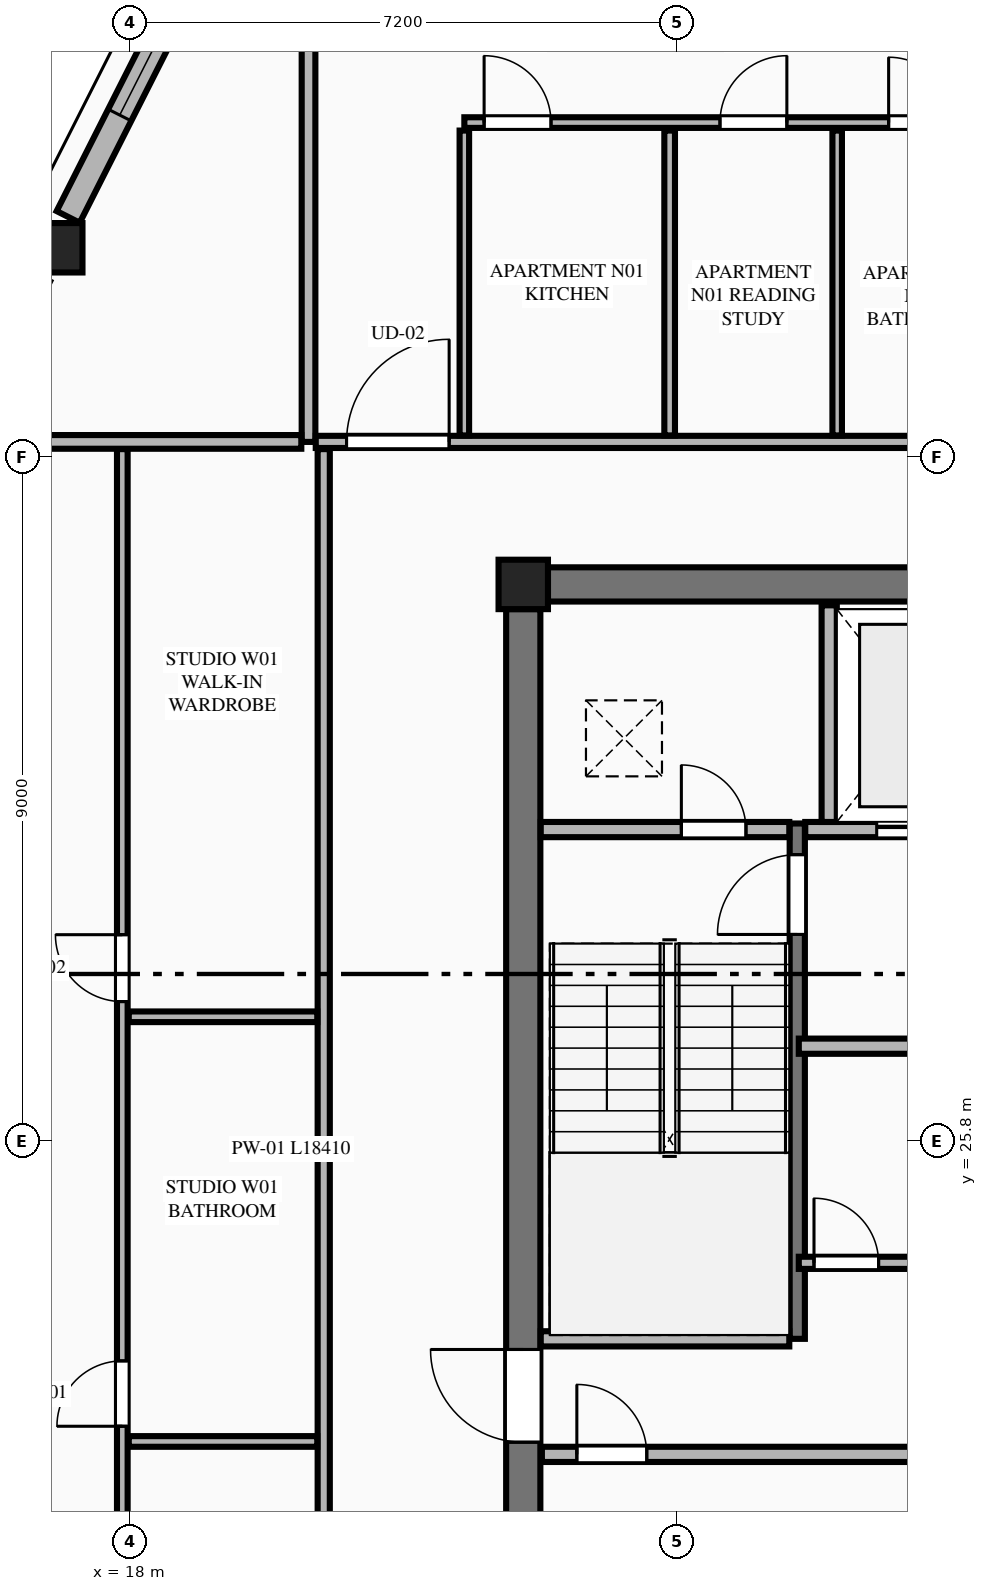
"""IFC4 building model, lengths in metres.
Left out: names, types, materials, properties, quantities, classifications, styles, units other than length and angle.
Written with IfcOpenShell. Run it as: python <this file> out.ifc"""

import sys

from ifc_helpers import new_model, si_unit, direction, frame, frame_2d, origin, origin_2d, place, context, subcontext, project, spatial, rectangle, extrude, element, fill, save


model = new_model("IFC4")
c1 = context("Model", 3, precision=1e-05, world=origin(), true_north=direction((0.0, 1.0)))
c2 = subcontext(c1, "Body", "Model", "MODEL_VIEW")
j1 = project(units=[si_unit("LENGTHUNIT", "METRE"), si_unit("PLANEANGLEUNIT", "RADIAN")], contexts=[c1])
p1 = place(None, origin())
s1 = spatial("IfcSite", under=j1, at=p1, CompositionType="ELEMENT")
p2 = place(p1, origin())
s2 = spatial("IfcBuilding", under=s1, at=p2, CompositionType="ELEMENT")
p3 = place(p2, frame((0.0, 0.0, 263.5)))
s3 = spatial("IfcBuildingStorey", under=s2, at=p3, CompositionType="ELEMENT", Elevation=263.5)
p4 = place(p3, frame((23.175, 33.125, 0.0), z_axis=(0.0, 0.0, 1.0), x_axis=(1.0, 0.0, 0.0)))
e1 = element("IfcColumn", 1, at=p4, inside=s3, PredefinedType="COLUMN", context=c2, shape_type="SweptSolid", body=[
    extrude(rectangle(XDim=0.65, YDim=0.65, at=origin_2d()), origin(), (0.0, 0.0, 1.0), 3.65),
])
p5 = place(p3, frame((23.5, 33.125, 0.0), z_axis=(0.0, 0.0, 1.0), x_axis=(1.0, 0.0, 0.0)))
e2 = element("IfcWall", 2, at=p5, inside=s3, PredefinedType="SHEAR", context=c2, shape_type="SweptSolid", body=[
    extrude(rectangle(XDim=17.8, YDim=0.45, at=frame_2d((8.9, 0.0))), origin(), (0.0, 0.0, 1.0), 3.45),
])
p6 = place(p3, frame((23.175, 19.0, 0.0), z_axis=(0.0, 0.0, 1.0), x_axis=(0.0, 1.0, 0.0)))
e3 = element("IfcWall", 3, at=p6, inside=s3, PredefinedType="SHEAR", context=c2, shape_type="SweptSolid", body=[
    extrude(rectangle(XDim=13.8, YDim=0.45, at=frame_2d((6.9, 0.0))), origin(), (0.0, 0.0, 1.0), 3.45),
])
p7 = place(p6, frame((2.84, 0.0, 0.0)))
e4 = element("IfcOpeningElement", 4, at=p7, cuts=e3, PredefinedType="OPENING", context=c2, shape_type="SweptSolid", body=[
    extrude(rectangle(XDim=1.22, YDim=2.25, at=frame_2d((0.61, 1.125))), frame((0.0, 0.235, 0.0), z_axis=(0.0, -1.0, 0.0), x_axis=(1.0, 0.0, 0.0)), (0.0, 0.0, 1.0), 0.47),
])
p8 = place(p3, frame((17.051, 37.554, 0.0), z_axis=(0.0, 0.0, 1.0), x_axis=(1.0, 0.0, 0.0)))
e5 = element("IfcColumn", 5, at=p8, inside=s3, PredefinedType="COLUMN", context=c2, shape_type="SweptSolid", body=[
    extrude(rectangle(XDim=0.65, YDim=0.65, at=origin_2d()), origin(), (0.0, 0.0, 1.0), 3.65),
])
p9 = place(p3, frame((26.78, 23.2, 0.0), z_axis=(0.0, 0.0, 1.0), x_axis=(0.0, 1.0, 0.0)))
e6 = element("IfcWall", 6, at=p9, inside=s3, PredefinedType="SHEAR", context=c2, shape_type="SweptSolid", body=[
    extrude(rectangle(XDim=6.78, YDim=0.2, at=frame_2d((3.39, 0.0))), origin(), (0.0, 0.0, 1.0), 3.65),
])
p10 = place(p9, frame((5.32, 0.0, 0.0)))
e7 = element("IfcOpeningElement", 7, at=p10, cuts=e6, PredefinedType="OPENING", context=c2, shape_type="SweptSolid", body=[
    extrude(rectangle(XDim=1.05, YDim=2.15, at=frame_2d((0.525, 1.075))), frame((0.0, 0.11, 0.0), z_axis=(0.0, -1.0, 0.0), x_axis=(1.0, 0.0, 0.0)), (0.0, 0.0, 1.0), 0.22),
])
p11 = place(p3, frame((23.405, 23.2, 0.0), z_axis=(0.0, 0.0, 1.0), x_axis=(1.0, 0.0, 0.0)))
e8 = element("IfcWall", 8, at=p11, inside=s3, PredefinedType="PLUMBINGWALL", context=c2, shape_type="SweptSolid", body=[
    extrude(rectangle(XDim=3.27, YDim=0.2, at=frame_2d((1.635, 0.0))), origin(), (0.0, 0.0, 1.0), 3.45),
])
p12 = place(p3, frame((23.405, 29.9, 0.0), z_axis=(0.0, 0.0, 1.0), x_axis=(1.0, 0.0, 0.0)))
e9 = element("IfcWall", 9, at=p12, inside=s3, PredefinedType="PLUMBINGWALL", context=c2, shape_type="SweptSolid", body=[
    extrude(rectangle(XDim=3.27, YDim=0.2, at=frame_2d((1.635, 0.0))), origin(), (0.0, 0.0, 1.0), 3.45),
])
p13 = place(p12, frame((1.85, 0.0, 0.0)))
e10 = element("IfcOpeningElement", 10, at=p13, cuts=e9, PredefinedType="OPENING", context=c2, shape_type="SweptSolid", body=[
    extrude(rectangle(XDim=0.85, YDim=2.05, at=frame_2d((0.425, 1.025))), frame((0.0, 0.11, 0.0), z_axis=(0.0, -1.0, 0.0), x_axis=(1.0, 0.0, 0.0)), (0.0, 0.0, 1.0), 0.22),
])
p14 = place(p3, frame((26.885, 29.9, 0.0), z_axis=(0.0, 0.0, 1.0), x_axis=(1.0, 0.0, 0.0)))
e11 = element("IfcWall", 11, at=p14, inside=s3, PredefinedType="PLUMBINGWALL", context=c2, shape_type="SweptSolid", body=[
    extrude(rectangle(XDim=3.015, YDim=0.2, at=frame_2d((1.507, 0.0))), origin(), (0.0, 0.0, 1.0), 3.45),
])
p15 = place(p14, frame((0.94, 0.0, 0.0)))
e12 = element("IfcOpeningElement", 12, at=p15, cuts=e11, PredefinedType="OPENING", context=c2, shape_type="SweptSolid", body=[
    extrude(rectangle(XDim=1.15, YDim=2.2, at=frame_2d((0.575, 1.1))), frame((0.0, 0.11, 0.0), z_axis=(0.0, -1.0, 0.0), x_axis=(1.0, 0.0, 0.0)), (0.0, 0.0, 1.0), 0.22),
])
p16 = place(p3, frame((27.2, 30.0, 0.0), z_axis=(0.0, 0.0, 1.0), x_axis=(0.0, 1.0, 0.0)))
e13 = element("IfcWall", 13, at=p16, inside=s3, PredefinedType="PLUMBINGWALL", context=c2, shape_type="SweptSolid", body=[
    extrude(rectangle(XDim=2.85, YDim=0.2, at=frame_2d((1.425, 0.0))), origin(), (0.0, 0.0, 1.0), 3.45),
])
p17 = place(p3, frame((26.8, 27.05, 0.0), z_axis=(0.0, 0.0, 1.0), x_axis=(1.0, 0.0, 0.0)))
e14 = element("IfcWall", 14, at=p17, inside=s3, PredefinedType="PLUMBINGWALL", context=c2, shape_type="SweptSolid", body=[
    extrude(rectangle(XDim=3.2, YDim=0.2, at=frame_2d((1.6, 0.0))), origin(), (0.0, 0.0, 1.0), 3.45),
])
p18 = place(p3, frame((26.8, 24.2, 0.0), z_axis=(0.0, 0.0, 1.0), x_axis=(1.0, 0.0, 0.0)))
e15 = element("IfcWall", 15, at=p18, inside=s3, PredefinedType="PARTITIONING", context=c2, shape_type="SweptSolid", body=[
    extrude(rectangle(XDim=3.2, YDim=0.16, at=frame_2d((1.6, 0.0))), origin(), (0.0, 0.0, 1.0), 3.45),
])
p19 = place(p18, frame((0.2, 0.0, 0.0)))
e16 = element("IfcOpeningElement", 16, at=p19, cuts=e15, PredefinedType="OPENING", context=c2, shape_type="SweptSolid", body=[
    extrude(rectangle(XDim=0.85, YDim=2.05, at=frame_2d((0.425, 1.025))), frame((0.0, 0.09, 0.0), z_axis=(0.0, -1.0, 0.0), x_axis=(1.0, 0.0, 0.0)), (0.0, 0.0, 1.0), 0.18),
])
p20 = place(p18, frame((1.8, 0.0, 0.0)))
e17 = element("IfcOpeningElement", 17, at=p20, cuts=e15, PredefinedType="OPENING", context=c2, shape_type="SweptSolid", body=[
    extrude(rectangle(XDim=0.85, YDim=2.05, at=frame_2d((0.425, 1.025))), frame((0.0, 0.09, 0.0), z_axis=(0.0, -1.0, 0.0), x_axis=(1.0, 0.0, 0.0)), (0.0, 0.0, 1.0), 0.18),
])
p21 = place(p3, frame((23.42, 21.68, 0.0), z_axis=(0.0, 0.0, 1.0), x_axis=(1.0, 0.0, 0.0)))
e18 = element("IfcWall", 18, at=p21, inside=s3, PredefinedType="PLUMBINGWALL", context=c2, shape_type="SweptSolid", body=[
    extrude(rectangle(XDim=17.96, YDim=0.2, at=frame_2d((8.98, 0.0))), origin(), (0.0, 0.0, 1.0), 3.45),
])
p22 = place(p21, frame((0.46, 0.0, 0.0)))
e19 = element("IfcOpeningElement", 19, at=p22, cuts=e18, PredefinedType="OPENING", context=c2, shape_type="SweptSolid", body=[
    extrude(rectangle(XDim=0.92, YDim=2.15, at=frame_2d((0.46, 1.075))), frame((0.0, 0.11, 0.0), z_axis=(0.0, -1.0, 0.0), x_axis=(1.0, 0.0, 0.0)), (0.0, 0.0, 1.0), 0.22),
])
p23 = place(p21, frame((6.48, 0.0, 0.0)))
e20 = element("IfcOpeningElement", 20, at=p23, cuts=e18, PredefinedType="OPENING", context=c2, shape_type="SweptSolid", body=[
    extrude(rectangle(XDim=0.92, YDim=2.15, at=frame_2d((0.46, 1.075))), frame((0.0, 0.11, 0.0), z_axis=(0.0, -1.0, 0.0), x_axis=(1.0, 0.0, 0.0)), (0.0, 0.0, 1.0), 0.22),
])
p24 = place(p21, frame((12.48, 0.0, 0.0)))
e21 = element("IfcOpeningElement", 21, at=p24, cuts=e18, PredefinedType="OPENING", context=c2, shape_type="SweptSolid", body=[
    extrude(rectangle(XDim=0.92, YDim=2.15, at=frame_2d((0.46, 1.075))), frame((0.0, 0.11, 0.0), z_axis=(0.0, -1.0, 0.0), x_axis=(1.0, 0.0, 0.0)), (0.0, 0.0, 1.0), 0.22),
])
p25 = place(p3, frame((19.244, 42.023, 0.0), z_axis=(0.0, 0.0, 1.0), x_axis=(-0.45149770819, -0.892272278791, 0.0)))
e22 = element("IfcWall", 22, at=p25, inside=s3, PredefinedType="STANDARD", context=c2, shape_type="SweptSolid", body=[
    extrude(rectangle(XDim=4.553, YDim=0.34, at=frame_2d((2.277, 0.0))), origin(), (0.0, 0.0, 1.0), 2.983),
])
p26 = place(p25, frame((1.502, 0.0, 0.75)))
e23 = element("IfcOpeningElement", 23, at=p26, cuts=e22, PredefinedType="OPENING", context=c2, shape_type="SweptSolid", body=[
    extrude(rectangle(XDim=1.55, YDim=2.05, at=frame_2d((0.775, 1.025))), frame((0.0, 0.18, 0.0), z_axis=(0.0, -1.0, 0.0), x_axis=(1.0, 0.0, 0.0)), (0.0, 0.0, 1.0), 0.36),
])
p27 = place(p3, frame((20.35, 35.0, 0.0), z_axis=(0.0, 0.0, 1.0), x_axis=(0.0, 1.0, 0.0)))
e24 = element("IfcWall", 24, at=p27, inside=s3, PredefinedType="PARTITIONING", context=c2, shape_type="SweptSolid", body=[
    extrude(rectangle(XDim=8.481, YDim=0.18, at=frame_2d((4.24, 0.0))), origin(), (0.0, 0.0, 1.0), 3.45),
])
p28 = place(p3, frame((20.445, 35.0, 0.0), z_axis=(0.0, 0.0, 1.0), x_axis=(1.0, 0.0, 0.0)))
e25 = element("IfcWall", 25, at=p28, inside=s3, PredefinedType="PARTITIONING", context=c2, shape_type="SweptSolid", body=[
    extrude(rectangle(XDim=23.91, YDim=0.16, at=frame_2d((11.955, 0.0))), origin(), (0.0, 0.0, 1.0), 3.45),
])
p29 = place(p28, frame((0.405, 0.0, 0.0)))
e26 = element("IfcOpeningElement", 26, at=p29, cuts=e25, PredefinedType="OPENING", context=c2, shape_type="SweptSolid", body=[
    extrude(rectangle(XDim=1.35, YDim=2.35, at=frame_2d((0.675, 1.175))), frame((0.0, 0.09, 0.0), z_axis=(0.0, -1.0, 0.0), x_axis=(1.0, 0.0, 0.0)), (0.0, 0.0, 1.0), 0.18),
])
p30 = place(p3, frame((22.4, 35.085, 0.0), z_axis=(0.0, 0.0, 1.0), x_axis=(0.0, 1.0, 0.0)))
e27 = element("IfcWall", 27, at=p30, inside=s3, PredefinedType="PARTITIONING", context=c2, shape_type="SweptSolid", body=[
    extrude(rectangle(XDim=4.011, YDim=0.125, at=frame_2d((2.005, 0.0))), origin(), (0.0, 0.0, 1.0), 3.45),
])
p31 = place(p3, frame((22.4, 39.201, 0.0), z_axis=(0.0, 0.0, 1.0), x_axis=(1.0, 0.0, 0.0)))
e28 = element("IfcWall", 28, at=p31, inside=s3, PredefinedType="PLUMBINGWALL", context=c2, shape_type="SweptSolid", body=[
    extrude(rectangle(XDim=7.108, YDim=0.14, at=frame_2d((3.554, 0.0))), origin(), (0.0, 0.0, 1.0), 3.45),
])
p32 = place(p31, frame((5.582, 0.0, 0.0)))
e29 = element("IfcOpeningElement", 29, at=p32, cuts=e28, PredefinedType="OPENING", context=c2, shape_type="SweptSolid", body=[
    extrude(rectangle(XDim=0.86, YDim=2.1, at=frame_2d((0.43, 1.05))), frame((0.0, 0.08, 0.0), z_axis=(0.0, -1.0, 0.0), x_axis=(1.0, 0.0, 0.0)), (0.0, 0.0, 1.0), 0.16),
])
p33 = place(p31, frame((0.26, 0.0, 0.0)))
e30 = element("IfcOpeningElement", 30, at=p33, cuts=e28, PredefinedType="OPENING", context=c2, shape_type="SweptSolid", body=[
    extrude(rectangle(XDim=0.88, YDim=2.15, at=frame_2d((0.44, 1.075))), frame((0.0, 0.08, 0.0), z_axis=(0.0, -1.0, 0.0), x_axis=(1.0, 0.0, 0.0)), (0.0, 0.0, 1.0), 0.16),
])
p34 = place(p31, frame((3.363, 0.0, 0.0)))
e31 = element("IfcOpeningElement", 31, at=p34, cuts=e28, PredefinedType="OPENING", context=c2, shape_type="SweptSolid", body=[
    extrude(rectangle(XDim=0.88, YDim=2.15, at=frame_2d((0.44, 1.075))), frame((0.0, 0.08, 0.0), z_axis=(0.0, -1.0, 0.0), x_axis=(1.0, 0.0, 0.0)), (0.0, 0.0, 1.0), 0.16),
])
p35 = place(p3, frame((25.101, 35.085, 0.0), z_axis=(0.0, 0.0, 1.0), x_axis=(0.0, 1.0, 0.0)))
e32 = element("IfcWall", 32, at=p35, inside=s3, PredefinedType="PLUMBINGWALL", context=c2, shape_type="SweptSolid", body=[
    extrude(rectangle(XDim=4.011, YDim=0.14, at=frame_2d((2.005, 0.0))), origin(), (0.0, 0.0, 1.0), 3.45),
])
p36 = place(p3, frame((27.305, 35.085, 0.0), z_axis=(0.0, 0.0, 1.0), x_axis=(0.0, 1.0, 0.0)))
e33 = element("IfcWall", 33, at=p36, inside=s3, PredefinedType="PARTITIONING", context=c2, shape_type="SweptSolid", body=[
    extrude(rectangle(XDim=4.011, YDim=0.125, at=frame_2d((2.005, 0.0))), origin(), (0.0, 0.0, 1.0), 3.45),
])
p37 = place(p3, frame((15.933, 35.0, 0.0), z_axis=(0.0, 0.0, 1.0), x_axis=(1.0, 0.0, 0.0)))
e34 = element("IfcWall", 34, at=p37, inside=s3, PredefinedType="PARTITIONING", context=c2, shape_type="SweptSolid", body=[
    extrude(rectangle(XDim=4.322, YDim=0.18, at=frame_2d((2.161, 0.0))), origin(), (0.0, 0.0, 1.0), 3.45),
])
p38 = place(p3, frame((20.55, 16.495, 0.0), z_axis=(0.0, 0.0, 1.0), x_axis=(0.0, 1.0, 0.0)))
e35 = element("IfcWall", 35, at=p38, inside=s3, PredefinedType="PARTITIONING", context=c2, shape_type="SweptSolid", body=[
    extrude(rectangle(XDim=18.41, YDim=0.16, at=frame_2d((9.205, 0.0))), origin(), (0.0, 0.0, 1.0), 3.137),
])
p39 = place(p38, frame((0.4, 0.0, 0.0)))
e36 = element("IfcOpeningElement", 36, at=p39, cuts=e35, PredefinedType="OPENING", context=c2, shape_type="SweptSolid", body=[
    extrude(rectangle(XDim=1.02, YDim=2.25, at=frame_2d((0.51, 1.125))), frame((0.0, 0.09, 0.0), z_axis=(0.0, -1.0, 0.0), x_axis=(1.0, 0.0, 0.0)), (0.0, 0.0, 1.0), 0.18),
])
p40 = place(p3, frame((17.9, 18.45, 0.0), z_axis=(0.0, 0.0, 1.0), x_axis=(0.0, 1.0, 0.0)))
e37 = element("IfcWall", 37, at=p40, inside=s3, PredefinedType="PLUMBINGWALL", context=c2, shape_type="SweptSolid", body=[
    extrude(rectangle(XDim=16.455, YDim=0.14, at=frame_2d((8.228, 0.0))), origin(), (0.0, 0.0, 1.0), 3.45),
])
p41 = place(p40, frame((3.6, 0.0, 0.0)))
e38 = element("IfcOpeningElement", 38, at=p41, cuts=e37, PredefinedType="OPENING", context=c2, shape_type="SweptSolid", body=[
    extrude(rectangle(XDim=0.86, YDim=2.1, at=frame_2d((0.43, 1.05))), frame((0.0, 0.08, 0.0), z_axis=(0.0, -1.0, 0.0), x_axis=(1.0, 0.0, 0.0)), (0.0, 0.0, 1.0), 0.16),
])
p42 = place(p40, frame((9.187, 0.0, 0.0)))
e39 = element("IfcOpeningElement", 39, at=p42, cuts=e37, PredefinedType="OPENING", context=c2, shape_type="SweptSolid", body=[
    extrude(rectangle(XDim=0.88, YDim=2.15, at=frame_2d((0.44, 1.075))), frame((0.0, 0.08, 0.0), z_axis=(0.0, -1.0, 0.0), x_axis=(1.0, 0.0, 0.0)), (0.0, 0.0, 1.0), 0.16),
])
p43 = place(p40, frame((0.2, 0.0, 0.0)))
e40 = element("IfcOpeningElement", 40, at=p43, cuts=e37, PredefinedType="OPENING", context=c2, shape_type="SweptSolid", body=[
    extrude(rectangle(XDim=0.88, YDim=2.15, at=frame_2d((0.44, 1.075))), frame((0.0, 0.08, 0.0), z_axis=(0.0, -1.0, 0.0), x_axis=(1.0, 0.0, 0.0)), (0.0, 0.0, 1.0), 0.16),
])
for number, where, z_axis, x_axis in (
    (41, (17.985, 21.85, 0.0), (0.0, 0.0, 1.0), (1.0, 0.0, 0.0)),
    (42, (17.985, 27.437, 0.0), (0.0, 0.0, 1.0), (1.0, 0.0, 0.0)),
):
    element("IfcWall", number, at=place(p3, frame(where, z_axis=z_axis, x_axis=x_axis)), inside=s3, PredefinedType="PLUMBINGWALL", context=c2, shape_type="SweptSolid", body=[
        extrude(rectangle(XDim=2.48, YDim=0.14, at=frame_2d((1.24, 0.0))), origin(), (0.0, 0.0, 1.0), 3.45),
    ])
p44 = place(p7, origin())
e43 = element("IfcDoor", 43, at=p44, inside=s3, OperationType="SINGLE_SWING_RIGHT", PredefinedType="DOOR", context=c2, shape_type="SweptSolid", body=[
    extrude(rectangle(XDim=1.22, YDim=2.25, at=frame_2d((0.61, 1.125))), frame((0.0, 0.025, 0.0), z_axis=(0.0, -1.0, 0.0), x_axis=(1.0, 0.0, 0.0)), (0.0, 0.0, 1.0), 0.05),
])
fill(e4, e43)
p45 = place(p10, origin())
e44 = element("IfcDoor", 44, at=p45, inside=s3, OperationType="SINGLE_SWING_LEFT", PredefinedType="DOOR", context=c2, shape_type="SweptSolid", body=[
    extrude(rectangle(XDim=1.05, YDim=2.15, at=frame_2d((0.525, 1.075))), frame((0.0, 0.025, 0.0), z_axis=(0.0, -1.0, 0.0), x_axis=(1.0, 0.0, 0.0)), (0.0, 0.0, 1.0), 0.05),
])
fill(e7, e44)
p46 = place(p13, origin())
e45 = element("IfcDoor", 45, at=p46, inside=s3, OperationType="SINGLE_SWING_LEFT", PredefinedType="DOOR", context=c2, shape_type="SweptSolid", body=[
    extrude(rectangle(XDim=0.85, YDim=2.05, at=frame_2d((0.425, 1.025))), frame((0.0, 0.025, 0.0), z_axis=(0.0, -1.0, 0.0), x_axis=(1.0, 0.0, 0.0)), (0.0, 0.0, 1.0), 0.05),
])
fill(e10, e45)
p47 = place(p15, origin())
e46 = element("IfcDoor", 46, at=p47, inside=s3, OperationType="DOUBLE_DOOR_SLIDING", PredefinedType="DOOR", context=c2, shape_type="SweptSolid", body=[
    extrude(rectangle(XDim=1.15, YDim=2.2, at=frame_2d((0.575, 1.1))), frame((0.0, 0.025, 0.0), z_axis=(0.0, -1.0, 0.0), x_axis=(1.0, 0.0, 0.0)), (0.0, 0.0, 1.0), 0.05),
])
fill(e12, e46)
p48 = place(p19, origin())
e47 = element("IfcDoor", 47, at=p48, inside=s3, OperationType="SINGLE_SWING_LEFT", PredefinedType="DOOR", context=c2, shape_type="SweptSolid", body=[
    extrude(rectangle(XDim=0.85, YDim=2.05, at=frame_2d((0.425, 1.025))), frame((0.0, 0.025, 0.0), z_axis=(0.0, -1.0, 0.0), x_axis=(1.0, 0.0, 0.0)), (0.0, 0.0, 1.0), 0.05),
])
fill(e16, e47)
p49 = place(p22, origin())
e48 = element("IfcDoor", 48, at=p49, inside=s3, OperationType="SINGLE_SWING_LEFT", PredefinedType="DOOR", context=c2, shape_type="SweptSolid", body=[
    extrude(rectangle(XDim=0.92, YDim=2.15, at=frame_2d((0.46, 1.075))), frame((0.0, 0.025, 0.0), z_axis=(0.0, -1.0, 0.0), x_axis=(1.0, 0.0, 0.0)), (0.0, 0.0, 1.0), 0.05),
])
fill(e19, e48)
p50 = place(p26, origin())
e49 = element("IfcWindow", 49, at=p50, inside=s3, PartitioningType="SINGLE_PANEL", PredefinedType="WINDOW", context=c2, shape_type="SweptSolid", body=[
    extrude(rectangle(XDim=1.55, YDim=2.05, at=frame_2d((0.775, 1.025))), frame((0.0, 0.03, 0.0), z_axis=(0.0, -1.0, 0.0), x_axis=(1.0, 0.0, 0.0)), (0.0, 0.0, 1.0), 0.06),
])
fill(e23, e49)
p51 = place(p32, origin())
e50 = element("IfcDoor", 50, at=p51, inside=s3, OperationType="SINGLE_SWING_LEFT", PredefinedType="DOOR", context=c2, shape_type="SweptSolid", body=[
    extrude(rectangle(XDim=0.86, YDim=2.1, at=frame_2d((0.43, 1.05))), frame((0.0, 0.025, 0.0), z_axis=(0.0, -1.0, 0.0), x_axis=(1.0, 0.0, 0.0)), (0.0, 0.0, 1.0), 0.05),
])
fill(e29, e50)
p52 = place(p29, origin())
e51 = element("IfcDoor", 51, at=p52, inside=s3, OperationType="SINGLE_SWING_RIGHT", PredefinedType="DOOR", context=c2, shape_type="SweptSolid", body=[
    extrude(rectangle(XDim=1.35, YDim=2.35, at=frame_2d((0.675, 1.175))), frame((0.0, 0.025, 0.0), z_axis=(0.0, -1.0, 0.0), x_axis=(1.0, 0.0, 0.0)), (0.0, 0.0, 1.0), 0.05),
])
fill(e26, e51)
p53 = place(p33, origin())
e52 = element("IfcDoor", 52, at=p53, inside=s3, OperationType="SINGLE_SWING_LEFT", PredefinedType="DOOR", context=c2, shape_type="SweptSolid", body=[
    extrude(rectangle(XDim=0.88, YDim=2.15, at=frame_2d((0.44, 1.075))), frame((0.0, 0.025, 0.0), z_axis=(0.0, -1.0, 0.0), x_axis=(1.0, 0.0, 0.0)), (0.0, 0.0, 1.0), 0.05),
])
fill(e30, e52)
p54 = place(p34, origin())
e53 = element("IfcDoor", 53, at=p54, inside=s3, OperationType="SINGLE_SWING_RIGHT", PredefinedType="DOOR", context=c2, shape_type="SweptSolid", body=[
    extrude(rectangle(XDim=0.88, YDim=2.15, at=frame_2d((0.44, 1.075))), frame((0.0, 0.025, 0.0), z_axis=(0.0, -1.0, 0.0), x_axis=(1.0, 0.0, 0.0)), (0.0, 0.0, 1.0), 0.05),
])
fill(e31, e53)
p55 = place(p41, origin())
e54 = element("IfcDoor", 54, at=p55, inside=s3, OperationType="SINGLE_SWING_LEFT", PredefinedType="DOOR", context=c2, shape_type="SweptSolid", body=[
    extrude(rectangle(XDim=0.86, YDim=2.1, at=frame_2d((0.43, 1.05))), frame((0.0, 0.025, 0.0), z_axis=(0.0, -1.0, 0.0), x_axis=(1.0, 0.0, 0.0)), (0.0, 0.0, 1.0), 0.05),
])
fill(e38, e54)
p56 = place(p42, origin())
e55 = element("IfcDoor", 55, at=p56, inside=s3, OperationType="SINGLE_SWING_RIGHT", PredefinedType="DOOR", context=c2, shape_type="SweptSolid", body=[
    extrude(rectangle(XDim=0.88, YDim=2.15, at=frame_2d((0.44, 1.075))), frame((0.0, 0.025, 0.0), z_axis=(0.0, -1.0, 0.0), x_axis=(1.0, 0.0, 0.0)), (0.0, 0.0, 1.0), 0.05),
])
fill(e39, e55)
save(model, sys.argv[1])
